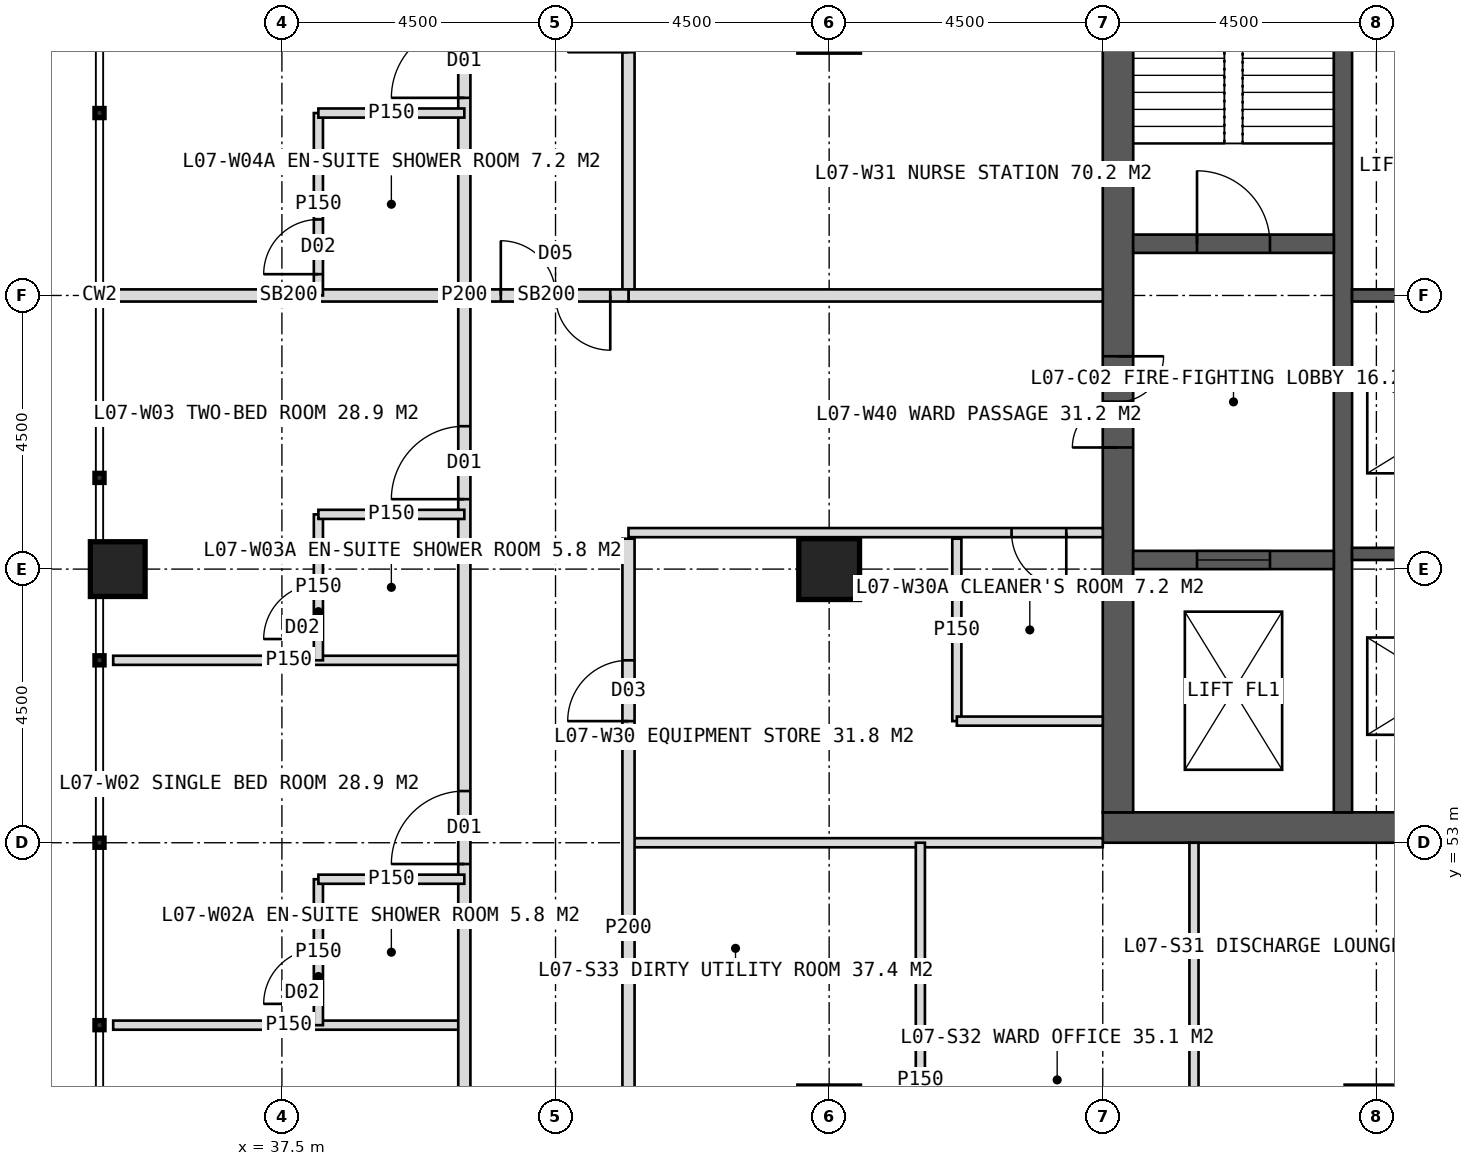
"""IFC4 building model, lengths in metres.
Left out: names, types, materials, properties, quantities, classifications, styles, units other than length and angle.
Written with IfcOpenShell. Run it as: python <this file> out.ifc"""

import sys

from ifc_helpers import new_model, si_unit, direction, frame, frame_2d, origin, origin_2d, place, context, subcontext, project, spatial, rectangle, hollow_rectangle, extrude, element, fill, save


model = new_model("IFC4")
c1 = context("Model", 3, precision=1e-05, world=origin(), true_north=direction((0.0, 1.0)))
c2 = subcontext(c1, "Body", "Model", "MODEL_VIEW")
j1 = project(units=[si_unit("LENGTHUNIT", "METRE"), si_unit("PLANEANGLEUNIT", "RADIAN")], contexts=[c1])
p1 = place(None, origin())
s1 = spatial("IfcSite", under=j1, at=p1, CompositionType="ELEMENT")
p2 = place(p1, origin())
s2 = spatial("IfcBuilding", under=s1, at=p2, CompositionType="ELEMENT")
p3 = place(p2, frame((0.0, 0.0, 35.0)))
s3 = spatial("IfcBuildingStorey", under=s2, at=p3, CompositionType="ELEMENT", Elevation=35.0)
p4 = place(p3, frame((51.0, 53.25, 0.0), z_axis=(0.0, 0.0, 1.0), x_axis=(1.0, 0.0, 0.0)))
e1 = element("IfcWall", 1, at=p4, inside=s3, PredefinedType="SHEAR", context=c2, shape_type="SweptSolid", body=[
    extrude(rectangle(XDim=18.0, YDim=0.5, at=frame_2d((9.0, 0.0))), origin(), (0.0, 0.0, 1.0), 4.0),
])
p5 = place(p4, frame((8.1, 0.0, 0.0)))
e2 = element("IfcOpeningElement", 2, at=p5, cuts=e1, PredefinedType="OPENING", context=c2, shape_type="SweptSolid", body=[
    extrude(rectangle(XDim=1.8, YDim=2.2, at=frame_2d((0.9, 1.1))), frame((0.0, 0.26, 0.0), z_axis=(0.0, -1.0, 0.0), x_axis=(1.0, 0.0, 0.0)), (0.0, 0.0, 1.0), 0.52),
])
p6 = place(p3, frame((51.25, 53.5, 0.0), z_axis=(0.0, 0.0, 1.0), x_axis=(0.0, 1.0, 0.0)))
e3 = element("IfcWall", 3, at=p6, inside=s3, PredefinedType="SHEAR", context=c2, shape_type="SweptSolid", body=[
    extrude(rectangle(XDim=17.0, YDim=0.5, at=frame_2d((8.5, 0.0))), origin(), (0.0, 0.0, 1.0), 4.0),
])
p7 = place(p6, frame((6.0, 0.0, 0.0)))
e4 = element("IfcOpeningElement", 4, at=p7, cuts=e3, PredefinedType="OPENING", context=c2, shape_type="SweptSolid", body=[
    extrude(rectangle(XDim=1.5, YDim=2.2, at=frame_2d((0.75, 1.1))), frame((0.0, 0.26, 0.0), z_axis=(0.0, -1.0, 0.0), x_axis=(1.0, 0.0, 0.0)), (0.0, 0.0, 1.0), 0.52),
])
p8 = place(p3, frame((54.95, 53.5, 0.0), z_axis=(0.0, 0.0, 1.0), x_axis=(0.0, 1.0, 0.0)))
e5 = element("IfcWall", 5, at=p8, inside=s3, PredefinedType="SHEAR", context=c2, shape_type="SweptSolid", body=[
    extrude(rectangle(XDim=17.0, YDim=0.3, at=frame_2d((8.5, 0.0))), origin(), (0.0, 0.0, 1.0), 4.0),
])
for number, where, z_axis, x_axis in (
    (6, (55.1, 57.75, 0.0), (0.0, 0.0, 1.0), (1.0, 0.0, 0.0)),
    (7, (55.1, 62.0, 0.0), (0.0, 0.0, 1.0), (1.0, 0.0, 0.0)),
):
    element("IfcWall", number, at=place(p3, frame(where, z_axis=z_axis, x_axis=x_axis)), inside=s3, PredefinedType="SHEAR", context=c2, shape_type="SweptSolid", body=[
        extrude(rectangle(XDim=3.05, YDim=0.2, at=frame_2d((1.525, 0.0))), origin(), (0.0, 0.0, 1.0), 4.0),
    ])
p9 = place(p3, frame((51.5, 62.85, 0.0), z_axis=(0.0, 0.0, 1.0), x_axis=(1.0, 0.0, 0.0)))
e8 = element("IfcWall", 8, at=p9, inside=s3, PredefinedType="SHEAR", context=c2, shape_type="SweptSolid", body=[
    extrude(rectangle(XDim=3.3, YDim=0.3, at=frame_2d((1.65, 0.0))), origin(), (0.0, 0.0, 1.0), 4.0),
])
p10 = place(p9, frame((1.05, 0.0, 0.0)))
e9 = element("IfcOpeningElement", 9, at=p10, cuts=e8, PredefinedType="OPENING", context=c2, shape_type="SweptSolid", body=[
    extrude(rectangle(XDim=1.2, YDim=2.1, at=frame_2d((0.6, 1.05))), frame((0.0, 0.16, 0.0), z_axis=(0.0, -1.0, 0.0), x_axis=(1.0, 0.0, 0.0)), (0.0, 0.0, 1.0), 0.32),
])
p11 = place(p3, frame((51.5, 57.65, 0.0), z_axis=(0.0, 0.0, 1.0), x_axis=(1.0, 0.0, 0.0)))
e10 = element("IfcWall", 10, at=p11, inside=s3, PredefinedType="SHEAR", context=c2, shape_type="SweptSolid", body=[
    extrude(rectangle(XDim=3.3, YDim=0.3, at=frame_2d((1.65, 0.0))), origin(), (0.0, 0.0, 1.0), 4.0),
])
p12 = place(p11, frame((1.05, 0.0, 0.0)))
e11 = element("IfcOpeningElement", 11, at=p12, cuts=e10, PredefinedType="OPENING", context=c2, shape_type="SweptSolid", body=[
    extrude(rectangle(XDim=1.2, YDim=2.2, at=frame_2d((0.6, 1.1))), frame((0.0, 0.16, 0.0), z_axis=(0.0, -1.0, 0.0), x_axis=(1.0, 0.0, 0.0)), (0.0, 0.0, 1.0), 0.32),
])
p13 = place(p3, frame((46.5, 57.5, 0.0), z_axis=(0.0, 0.0, 1.0), x_axis=(1.0, 0.0, 0.0)))
e12 = element("IfcColumn", 12, at=p13, inside=s3, PredefinedType="COLUMN", context=c2, shape_type="SweptSolid", body=[
    extrude(hollow_rectangle(XDim=1.0, YDim=1.0, WallThickness=0.1, at=origin_2d()), origin(), (0.0, 0.0, 1.0), 4.0),
])
p14 = place(p3, frame((34.8, 57.5, 0.0), z_axis=(0.0, 0.0, 1.0), x_axis=(1.0, 0.0, 0.0)))
e13 = element("IfcColumn", 13, at=p14, inside=s3, PredefinedType="COLUMN", context=c2, shape_type="SweptSolid", body=[
    extrude(hollow_rectangle(XDim=0.9, YDim=0.9, WallThickness=0.08, at=origin_2d()), origin(), (0.0, 0.0, 1.0), 4.0),
])
for number, where, z_axis, x_axis in (
    (14, (40.5, 50.0, 0.0), (0.0, 0.0, 1.0), (-1.0, 0.0, 0.0)),
    (15, (40.5, 56.0, 0.0), (0.0, 0.0, 1.0), (-1.0, 0.0, 0.0)),
):
    element("IfcWall", number, at=place(p3, frame(where, z_axis=z_axis, x_axis=x_axis)), inside=s3, PredefinedType="PARTITIONING", context=c2, shape_type="SweptSolid", body=[
        extrude(rectangle(XDim=5.775, YDim=0.15, at=frame_2d((2.887, 0.0))), origin(), (0.0, 0.0, 1.0), 3.75),
    ])
p15 = place(p3, frame((40.5, 62.0, 0.0), z_axis=(0.0, 0.0, 1.0), x_axis=(-1.0, 0.0, 0.0)))
e16 = element("IfcWall", 16, at=p15, inside=s3, PredefinedType="SOLIDWALL", context=c2, shape_type="SweptSolid", body=[
    extrude(rectangle(XDim=5.775, YDim=0.2, at=frame_2d((2.887, 0.0))), origin(), (0.0, 0.0, 1.0), 2.75),
])
p16 = place(p3, frame((40.5, 42.5, 0.0), z_axis=(0.0, 0.0, 1.0), x_axis=(0.0, 1.0, 0.0)))
e17 = element("IfcWall", 17, at=p16, inside=s3, PredefinedType="PARTITIONING", context=c2, shape_type="SweptSolid", body=[
    extrude(rectangle(XDim=39.0, YDim=0.2, at=frame_2d((19.5, 0.0))), origin(), (0.0, 0.0, 1.0), 3.75),
])
p17 = place(p16, frame((3.25, 0.0, 0.0)))
e18 = element("IfcOpeningElement", 18, at=p17, cuts=e17, PredefinedType="OPENING", context=c2, shape_type="SweptSolid", body=[
    extrude(rectangle(XDim=1.2, YDim=2.2, at=frame_2d((0.6, 1.1))), frame((0.0, 0.11, 0.0), z_axis=(0.0, -1.0, 0.0), x_axis=(1.0, 0.0, 0.0)), (0.0, 0.0, 1.0), 0.22),
])
p18 = place(p16, frame((10.15, 0.0, 0.0)))
e19 = element("IfcOpeningElement", 19, at=p18, cuts=e17, PredefinedType="OPENING", context=c2, shape_type="SweptSolid", body=[
    extrude(rectangle(XDim=1.2, YDim=2.2, at=frame_2d((0.6, 1.1))), frame((0.0, 0.11, 0.0), z_axis=(0.0, -1.0, 0.0), x_axis=(1.0, 0.0, 0.0)), (0.0, 0.0, 1.0), 0.22),
])
p19 = place(p16, frame((16.15, 0.0, 0.0)))
e20 = element("IfcOpeningElement", 20, at=p19, cuts=e17, PredefinedType="OPENING", context=c2, shape_type="SweptSolid", body=[
    extrude(rectangle(XDim=1.2, YDim=2.2, at=frame_2d((0.6, 1.1))), frame((0.0, 0.11, 0.0), z_axis=(0.0, -1.0, 0.0), x_axis=(1.0, 0.0, 0.0)), (0.0, 0.0, 1.0), 0.22),
])
p20 = place(p16, frame((22.75, 0.0, 0.0)))
e21 = element("IfcOpeningElement", 21, at=p20, cuts=e17, PredefinedType="OPENING", context=c2, shape_type="SweptSolid", body=[
    extrude(rectangle(XDim=1.2, YDim=2.2, at=frame_2d((0.6, 1.1))), frame((0.0, 0.11, 0.0), z_axis=(0.0, -1.0, 0.0), x_axis=(1.0, 0.0, 0.0)), (0.0, 0.0, 1.0), 0.22),
])
p21 = place(p16, frame((31.15, 0.0, 0.0)))
e22 = element("IfcOpeningElement", 22, at=p21, cuts=e17, PredefinedType="OPENING", context=c2, shape_type="SweptSolid", body=[
    extrude(rectangle(XDim=1.2, YDim=2.2, at=frame_2d((0.6, 1.1))), frame((0.0, 0.11, 0.0), z_axis=(0.0, -1.0, 0.0), x_axis=(1.0, 0.0, 0.0)), (0.0, 0.0, 1.0), 0.22),
])
p22 = place(p3, frame((38.1, 50.0, 0.0), z_axis=(0.0, 0.0, 1.0), x_axis=(0.0, 1.0, 0.0)))
e23 = element("IfcWall", 23, at=p22, inside=s3, PredefinedType="PARTITIONING", context=c2, shape_type="SweptSolid", body=[
    extrude(rectangle(XDim=2.4, YDim=0.15, at=frame_2d((1.2, 0.0))), origin(), (0.0, 0.0, 1.0), 3.75),
])
p23 = place(p22, frame((0.35, 0.0, 0.0)))
e24 = element("IfcOpeningElement", 24, at=p23, cuts=e23, PredefinedType="OPENING", context=c2, shape_type="SweptSolid", body=[
    extrude(rectangle(XDim=0.9, YDim=2.1, at=frame_2d((0.45, 1.05))), frame((0.0, 0.085, 0.0), z_axis=(0.0, -1.0, 0.0), x_axis=(1.0, 0.0, 0.0)), (0.0, 0.0, 1.0), 0.17),
])
p24 = place(p3, frame((40.5, 52.4, 0.0), z_axis=(0.0, 0.0, 1.0), x_axis=(-1.0, 0.0, 0.0)))
e25 = element("IfcWall", 25, at=p24, inside=s3, PredefinedType="PARTITIONING", context=c2, shape_type="SweptSolid", body=[
    extrude(rectangle(XDim=2.4, YDim=0.15, at=frame_2d((1.2, 0.0))), origin(), (0.0, 0.0, 1.0), 3.75),
])
p25 = place(p3, frame((38.1, 56.0, 0.0), z_axis=(0.0, 0.0, 1.0), x_axis=(0.0, 1.0, 0.0)))
e26 = element("IfcWall", 26, at=p25, inside=s3, PredefinedType="PARTITIONING", context=c2, shape_type="SweptSolid", body=[
    extrude(rectangle(XDim=2.4, YDim=0.15, at=frame_2d((1.2, 0.0))), origin(), (0.0, 0.0, 1.0), 3.75),
])
p26 = place(p25, frame((0.35, 0.0, 0.0)))
e27 = element("IfcOpeningElement", 27, at=p26, cuts=e26, PredefinedType="OPENING", context=c2, shape_type="SweptSolid", body=[
    extrude(rectangle(XDim=0.9, YDim=2.1, at=frame_2d((0.45, 1.05))), frame((0.0, 0.085, 0.0), z_axis=(0.0, -1.0, 0.0), x_axis=(1.0, 0.0, 0.0)), (0.0, 0.0, 1.0), 0.17),
])
p27 = place(p3, frame((40.5, 58.4, 0.0), z_axis=(0.0, 0.0, 1.0), x_axis=(-1.0, 0.0, 0.0)))
e28 = element("IfcWall", 28, at=p27, inside=s3, PredefinedType="PARTITIONING", context=c2, shape_type="SweptSolid", body=[
    extrude(rectangle(XDim=2.4, YDim=0.15, at=frame_2d((1.2, 0.0))), origin(), (0.0, 0.0, 1.0), 3.75),
])
p28 = place(p3, frame((38.1, 62.0, 0.0), z_axis=(0.0, 0.0, 1.0), x_axis=(0.0, 1.0, 0.0)))
e29 = element("IfcWall", 29, at=p28, inside=s3, PredefinedType="PARTITIONING", context=c2, shape_type="SweptSolid", body=[
    extrude(rectangle(XDim=3.0, YDim=0.15, at=frame_2d((1.5, 0.0))), origin(), (0.0, 0.0, 1.0), 3.75),
])
p29 = place(p28, frame((0.35, 0.0, 0.0)))
e30 = element("IfcOpeningElement", 30, at=p29, cuts=e29, PredefinedType="OPENING", context=c2, shape_type="SweptSolid", body=[
    extrude(rectangle(XDim=0.9, YDim=2.1, at=frame_2d((0.45, 1.05))), frame((0.0, 0.085, 0.0), z_axis=(0.0, -1.0, 0.0), x_axis=(1.0, 0.0, 0.0)), (0.0, 0.0, 1.0), 0.17),
])
p30 = place(p3, frame((40.5, 65.0, 0.0), z_axis=(0.0, 0.0, 1.0), x_axis=(-1.0, 0.0, 0.0)))
e31 = element("IfcWall", 31, at=p30, inside=s3, PredefinedType="PARTITIONING", context=c2, shape_type="SweptSolid", body=[
    extrude(rectangle(XDim=2.4, YDim=0.15, at=frame_2d((1.2, 0.0))), origin(), (0.0, 0.0, 1.0), 3.75),
])
p31 = place(p3, frame((51.0, 53.0, 0.0), z_axis=(0.0, 0.0, 1.0), x_axis=(-1.0, 0.0, 0.0)))
e32 = element("IfcWall", 32, at=p31, inside=s3, PredefinedType="PARTITIONING", context=c2, shape_type="SweptSolid", body=[
    extrude(rectangle(XDim=7.8, YDim=0.15, at=frame_2d((3.9, 0.0))), origin(), (0.0, 0.0, 1.0), 3.75),
])
p32 = place(p3, frame((43.2, 45.2, 0.0), z_axis=(0.0, 0.0, 1.0), x_axis=(0.0, 1.0, 0.0)))
e33 = element("IfcWall", 33, at=p32, inside=s3, PredefinedType="PARTITIONING", context=c2, shape_type="SweptSolid", body=[
    extrude(rectangle(XDim=12.8, YDim=0.2, at=frame_2d((6.4, 0.0))), origin(), (0.0, 0.0, 1.0), 3.75),
])
p33 = place(p32, frame((9.8, 0.0, 0.0)))
e34 = element("IfcOpeningElement", 34, at=p33, cuts=e33, PredefinedType="OPENING", context=c2, shape_type="SweptSolid", body=[
    extrude(rectangle(XDim=1.0, YDim=2.1, at=frame_2d((0.5, 1.05))), frame((0.0, 0.11, 0.0), z_axis=(0.0, -1.0, 0.0), x_axis=(1.0, 0.0, 0.0)), (0.0, 0.0, 1.0), 0.22),
])
p34 = place(p3, frame((43.2, 62.0, 0.0), z_axis=(0.0, 0.0, 1.0), x_axis=(0.0, 1.0, 0.0)))
e35 = element("IfcWall", 35, at=p34, inside=s3, PredefinedType="PARTITIONING", context=c2, shape_type="SweptSolid", body=[
    extrude(rectangle(XDim=16.8, YDim=0.2, at=frame_2d((8.4, 0.0))), origin(), (0.0, 0.0, 1.0), 3.75),
])
p35 = place(p34, frame((4.0, 0.0, 0.0)))
e36 = element("IfcOpeningElement", 36, at=p35, cuts=e35, PredefinedType="OPENING", context=c2, shape_type="SweptSolid", body=[
    extrude(rectangle(XDim=1.0, YDim=2.1, at=frame_2d((0.5, 1.05))), frame((0.0, 0.11, 0.0), z_axis=(0.0, -1.0, 0.0), x_axis=(1.0, 0.0, 0.0)), (0.0, 0.0, 1.0), 0.22),
])
p36 = place(p34, frame((12.4, 0.0, 0.0)))
e37 = element("IfcOpeningElement", 37, at=p36, cuts=e35, PredefinedType="OPENING", context=c2, shape_type="SweptSolid", body=[
    extrude(rectangle(XDim=1.0, YDim=2.1, at=frame_2d((0.5, 1.05))), frame((0.0, 0.11, 0.0), z_axis=(0.0, -1.0, 0.0), x_axis=(1.0, 0.0, 0.0)), (0.0, 0.0, 1.0), 0.22),
])
p37 = place(p3, frame((51.0, 58.1, 0.0), z_axis=(0.0, 0.0, 1.0), x_axis=(-1.0, 0.0, 0.0)))
e38 = element("IfcWall", 38, at=p37, inside=s3, PredefinedType="PARTITIONING", context=c2, shape_type="SweptSolid", body=[
    extrude(rectangle(XDim=7.8, YDim=0.15, at=frame_2d((3.9, 0.0))), origin(), (0.0, 0.0, 1.0), 3.75),
])
p38 = place(p37, frame((0.6, 0.0, 0.0)))
e39 = element("IfcOpeningElement", 39, at=p38, cuts=e38, PredefinedType="OPENING", context=c2, shape_type="SweptSolid", body=[
    extrude(rectangle(XDim=0.9, YDim=2.1, at=frame_2d((0.45, 1.05))), frame((0.0, 0.085, 0.0), z_axis=(0.0, -1.0, 0.0), x_axis=(1.0, 0.0, 0.0)), (0.0, 0.0, 1.0), 0.17),
])
p39 = place(p3, frame((51.0, 62.0, 0.0), z_axis=(0.0, 0.0, 1.0), x_axis=(-1.0, 0.0, 0.0)))
e40 = element("IfcWall", 40, at=p39, inside=s3, PredefinedType="SOLIDWALL", context=c2, shape_type="SweptSolid", body=[
    extrude(rectangle(XDim=7.8, YDim=0.2, at=frame_2d((3.9, 0.0))), origin(), (0.0, 0.0, 1.0), 2.75),
])
p40 = place(p3, frame((48.6, 55.0, 0.0), z_axis=(0.0, 0.0, 1.0), x_axis=(0.0, 1.0, 0.0)))
e41 = element("IfcWall", 41, at=p40, inside=s3, PredefinedType="PARTITIONING", context=c2, shape_type="SweptSolid", body=[
    extrude(rectangle(XDim=3.0, YDim=0.15, at=frame_2d((1.5, 0.0))), origin(), (0.0, 0.0, 1.0), 3.75),
])
p41 = place(p3, frame((51.0, 55.0, 0.0), z_axis=(0.0, 0.0, 1.0), x_axis=(-1.0, 0.0, 0.0)))
e42 = element("IfcWall", 42, at=p41, inside=s3, PredefinedType="PARTITIONING", context=c2, shape_type="SweptSolid", body=[
    extrude(rectangle(XDim=2.4, YDim=0.15, at=frame_2d((1.2, 0.0))), origin(), (0.0, 0.0, 1.0), 3.75),
])
for number, where, z_axis, x_axis in (
    (43, (52.5, 53.0, 0.0), (0.0, 0.0, 1.0), (0.0, -1.0, 0.0)),
    (44, (48.0, 53.0, 0.0), (0.0, 0.0, 1.0), (0.0, -1.0, 0.0)),
):
    element("IfcWall", number, at=place(p3, frame(where, z_axis=z_axis, x_axis=x_axis)), inside=s3, PredefinedType="PARTITIONING", context=c2, shape_type="SweptSolid", body=[
        extrude(rectangle(XDim=7.8, YDim=0.15, at=frame_2d((3.9, 0.0))), origin(), (0.0, 0.0, 1.0), 3.75),
    ])
p42 = place(p3, frame((43.2, 62.0, 0.0), z_axis=(0.0, 0.0, 1.0), x_axis=(-1.0, 0.0, 0.0)))
e45 = element("IfcWall", 45, at=p42, inside=s3, PredefinedType="SOLIDWALL", context=c2, shape_type="SweptSolid", body=[
    extrude(rectangle(XDim=2.7, YDim=0.2, at=frame_2d((1.35, 0.0))), origin(), (0.0, 0.0, 1.0), 2.75),
])
p43 = place(p42, frame((0.3, 0.0, 0.0)))
e46 = element("IfcOpeningElement", 46, at=p43, cuts=e45, PredefinedType="OPENING", context=c2, shape_type="SweptSolid", body=[
    extrude(rectangle(XDim=1.8, YDim=2.2, at=frame_2d((0.9, 1.1))), frame((0.0, 0.11, 0.0), z_axis=(0.0, -1.0, 0.0), x_axis=(1.0, 0.0, 0.0)), (0.0, 0.0, 1.0), 0.22),
])
p44 = place(p18, origin())
e47 = element("IfcDoor", 47, at=p44, inside=s3, OperationType="SINGLE_SWING_LEFT", PredefinedType="DOOR", context=c2, shape_type="SweptSolid", body=[
    extrude(rectangle(XDim=1.2, YDim=2.2, at=frame_2d((0.6, 1.1))), frame((0.0, 0.025, 0.0), z_axis=(0.0, -1.0, 0.0), x_axis=(1.0, 0.0, 0.0)), (0.0, 0.0, 1.0), 0.05),
])
fill(e19, e47)
p45 = place(p23, origin())
e48 = element("IfcDoor", 48, at=p45, inside=s3, OperationType="SINGLE_SWING_LEFT", PredefinedType="DOOR", context=c2, shape_type="SweptSolid", body=[
    extrude(rectangle(XDim=0.9, YDim=2.1, at=frame_2d((0.45, 1.05))), frame((0.0, 0.025, 0.0), z_axis=(0.0, -1.0, 0.0), x_axis=(1.0, 0.0, 0.0)), (0.0, 0.0, 1.0), 0.05),
])
fill(e24, e48)
p46 = place(p19, origin())
e49 = element("IfcDoor", 49, at=p46, inside=s3, OperationType="SINGLE_SWING_LEFT", PredefinedType="DOOR", context=c2, shape_type="SweptSolid", body=[
    extrude(rectangle(XDim=1.2, YDim=2.2, at=frame_2d((0.6, 1.1))), frame((0.0, 0.025, 0.0), z_axis=(0.0, -1.0, 0.0), x_axis=(1.0, 0.0, 0.0)), (0.0, 0.0, 1.0), 0.05),
])
fill(e20, e49)
p47 = place(p26, origin())
e50 = element("IfcDoor", 50, at=p47, inside=s3, OperationType="SINGLE_SWING_LEFT", PredefinedType="DOOR", context=c2, shape_type="SweptSolid", body=[
    extrude(rectangle(XDim=0.9, YDim=2.1, at=frame_2d((0.45, 1.05))), frame((0.0, 0.025, 0.0), z_axis=(0.0, -1.0, 0.0), x_axis=(1.0, 0.0, 0.0)), (0.0, 0.0, 1.0), 0.05),
])
fill(e27, e50)
p48 = place(p20, origin())
e51 = element("IfcDoor", 51, at=p48, inside=s3, OperationType="SINGLE_SWING_LEFT", PredefinedType="DOOR", context=c2, shape_type="SweptSolid", body=[
    extrude(rectangle(XDim=1.2, YDim=2.2, at=frame_2d((0.6, 1.1))), frame((0.0, 0.025, 0.0), z_axis=(0.0, -1.0, 0.0), x_axis=(1.0, 0.0, 0.0)), (0.0, 0.0, 1.0), 0.05),
])
fill(e21, e51)
p49 = place(p29, origin())
e52 = element("IfcDoor", 52, at=p49, inside=s3, OperationType="SINGLE_SWING_LEFT", PredefinedType="DOOR", context=c2, shape_type="SweptSolid", body=[
    extrude(rectangle(XDim=0.9, YDim=2.1, at=frame_2d((0.45, 1.05))), frame((0.0, 0.025, 0.0), z_axis=(0.0, -1.0, 0.0), x_axis=(1.0, 0.0, 0.0)), (0.0, 0.0, 1.0), 0.05),
])
fill(e30, e52)
p50 = place(p38, origin())
e53 = element("IfcDoor", 53, at=p50, inside=s3, OperationType="SINGLE_SWING_LEFT", PredefinedType="DOOR", context=c2, shape_type="SweptSolid", body=[
    extrude(rectangle(XDim=0.9, YDim=2.1, at=frame_2d((0.45, 1.05))), frame((0.0, 0.025, 0.0), z_axis=(0.0, -1.0, 0.0), x_axis=(1.0, 0.0, 0.0)), (0.0, 0.0, 1.0), 0.05),
])
fill(e39, e53)
p51 = place(p33, origin())
e54 = element("IfcDoor", 54, at=p51, inside=s3, OperationType="SINGLE_SWING_LEFT", PredefinedType="DOOR", context=c2, shape_type="SweptSolid", body=[
    extrude(rectangle(XDim=1.0, YDim=2.1, at=frame_2d((0.5, 1.05))), frame((0.0, 0.025, 0.0), z_axis=(0.0, -1.0, 0.0), x_axis=(1.0, 0.0, 0.0)), (0.0, 0.0, 1.0), 0.05),
])
fill(e34, e54)
p52 = place(p43, origin())
e55 = element("IfcDoor", 55, at=p52, inside=s3, OperationType="DOUBLE_DOOR_DOUBLE_SWING", PredefinedType="DOOR", context=c2, shape_type="SweptSolid", body=[
    extrude(rectangle(XDim=1.8, YDim=2.2, at=frame_2d((0.9, 1.1))), frame((0.0, 0.025, 0.0), z_axis=(0.0, -1.0, 0.0), x_axis=(1.0, 0.0, 0.0)), (0.0, 0.0, 1.0), 0.05),
])
fill(e46, e55)
p53 = place(p7, origin())
e56 = element("IfcDoor", 56, at=p53, inside=s3, OperationType="DOUBLE_DOOR_SINGLE_SWING", PredefinedType="DOOR", context=c2, shape_type="SweptSolid", body=[
    extrude(rectangle(XDim=1.5, YDim=2.2, at=frame_2d((0.75, 1.1))), frame((0.0, 0.025, 0.0), z_axis=(0.0, -1.0, 0.0), x_axis=(1.0, 0.0, 0.0)), (0.0, 0.0, 1.0), 0.05),
])
fill(e4, e56)
p54 = place(p10, origin())
e57 = element("IfcDoor", 57, at=p54, inside=s3, OperationType="SINGLE_SWING_LEFT", PredefinedType="DOOR", context=c2, shape_type="SweptSolid", body=[
    extrude(rectangle(XDim=1.2, YDim=2.1, at=frame_2d((0.6, 1.05))), frame((0.0, 0.025, 0.0), z_axis=(0.0, -1.0, 0.0), x_axis=(1.0, 0.0, 0.0)), (0.0, 0.0, 1.0), 0.05),
])
fill(e9, e57)
p55 = place(p12, origin())
e58 = element("IfcDoor", 58, at=p55, inside=s3, OperationType="SLIDING_TO_LEFT", PredefinedType="DOOR", context=c2, shape_type="SweptSolid", body=[
    extrude(rectangle(XDim=1.2, YDim=2.2, at=frame_2d((0.6, 1.1))), frame((0.0, 0.025, 0.0), z_axis=(0.0, -1.0, 0.0), x_axis=(1.0, 0.0, 0.0)), (0.0, 0.0, 1.0), 0.05),
])
fill(e11, e58)
save(model, sys.argv[1])
